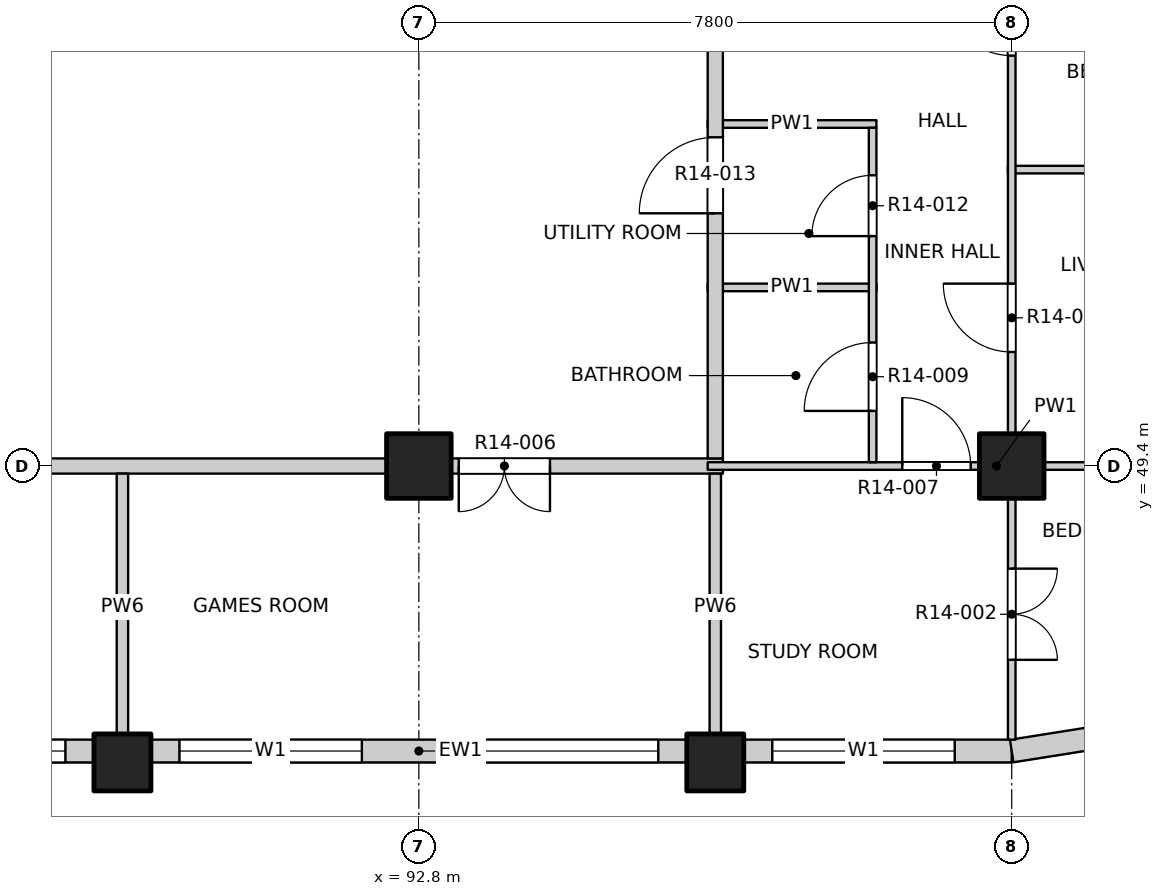
"""IFC4 building model, lengths in metres.
Left out: names, types, materials, properties, quantities, classifications, styles, units other than length and angle.
Written with IfcOpenShell. Run it as: python <this file> out.ifc"""

import sys

from ifc_helpers import new_model, si_unit, direction, frame, frame_2d, origin, origin_2d, place, context, subcontext, project, spatial, rectangle, extrude, element, fill, save


model = new_model("IFC4")
c1 = context("Model", 3, precision=1e-05, world=origin(), true_north=direction((0.0, 1.0)))
c2 = subcontext(c1, "Body", "Model", "MODEL_VIEW")
j1 = project(units=[si_unit("LENGTHUNIT", "METRE"), si_unit("PLANEANGLEUNIT", "RADIAN")], contexts=[c1])
p1 = place(None, origin())
s1 = spatial("IfcSite", under=j1, at=p1, CompositionType="ELEMENT")
p2 = place(p1, origin())
s2 = spatial("IfcBuilding", under=s1, at=p2, CompositionType="ELEMENT")
p3 = place(p2, frame((0.0, 0.0, 155.4)))
s3 = spatial("IfcBuildingStorey", under=s2, at=p3, CompositionType="ELEMENT", Elevation=155.4)
for number, where, z_axis, x_axis in (
    (1, (88.9, 45.5, -0.25), (0.0, 0.0, 1.0), (1.0, 0.0, 0.0)),
    (2, (96.7, 45.5, -0.25), (0.0, 0.0, 1.0), (1.0, 0.0, 0.0)),
):
    element("IfcColumn", number, at=place(p3, frame(where, z_axis=z_axis, x_axis=x_axis)), inside=s3, PredefinedType="COLUMN", context=c2, shape_type="SweptSolid", body=[
        extrude(rectangle(XDim=0.75, YDim=0.75, at=origin_2d()), origin(), (0.0, 0.0, 1.0), 3.4),
    ])
for number, where, z_axis, x_axis in (
    (3, (92.8, 49.4, -0.25), (0.0, 0.0, 1.0), (1.0, 0.0, 0.0)),
    (4, (100.6, 49.4, -0.25), (0.0, 0.0, 1.0), (1.0, 0.0, 0.0)),
):
    element("IfcColumn", number, at=place(p3, frame(where, z_axis=z_axis, x_axis=x_axis)), inside=s3, PredefinedType="COLUMN", context=c2, shape_type="SweptSolid", body=[
        extrude(rectangle(XDim=0.85, YDim=0.85, at=origin_2d()), origin(), (0.0, 0.0, 1.0), 3.4),
    ])
p4 = place(p3, frame((81.475, 45.65, 0.0), z_axis=(0.0, 0.0, 1.0), x_axis=(1.0, 0.0, 0.0)))
e5 = element("IfcWall", 5, at=p4, inside=s3, PredefinedType="SOLIDWALL", context=c2, shape_type="SweptSolid", body=[
    extrude(rectangle(XDim=7.05, YDim=0.3, at=frame_2d((3.525, 0.0))), origin(), (0.0, 0.0, 1.0), 2.7),
])
p5 = place(p4, frame((0.375, 0.0, 0.9)))
e6 = element("IfcOpeningElement", 6, at=p5, cuts=e5, PredefinedType="OPENING", context=c2, shape_type="SweptSolid", body=[
    extrude(rectangle(XDim=2.4, YDim=1.8, at=frame_2d((1.2, 0.9))), frame((0.0, 0.16, 0.0), z_axis=(0.0, -1.0, 0.0), x_axis=(1.0, 0.0, 0.0)), (0.0, 0.0, 1.0), 0.32),
])
p6 = place(p4, frame((4.275, 0.0, 0.9)))
e7 = element("IfcOpeningElement", 7, at=p6, cuts=e5, PredefinedType="OPENING", context=c2, shape_type="SweptSolid", body=[
    extrude(rectangle(XDim=2.4, YDim=1.8, at=frame_2d((1.2, 0.9))), frame((0.0, 0.16, 0.0), z_axis=(0.0, -1.0, 0.0), x_axis=(1.0, 0.0, 0.0)), (0.0, 0.0, 1.0), 0.32),
])
p7 = place(p3, frame((89.275, 45.65, 0.0), z_axis=(0.0, 0.0, 1.0), x_axis=(1.0, 0.0, 0.0)))
e8 = element("IfcWall", 8, at=p7, inside=s3, PredefinedType="SOLIDWALL", context=c2, shape_type="SweptSolid", body=[
    extrude(rectangle(XDim=7.05, YDim=0.3, at=frame_2d((3.525, 0.0))), origin(), (0.0, 0.0, 1.0), 2.7),
])
p8 = place(p7, frame((0.375, 0.0, 0.9)))
e9 = element("IfcOpeningElement", 9, at=p8, cuts=e8, PredefinedType="OPENING", context=c2, shape_type="SweptSolid", body=[
    extrude(rectangle(XDim=2.4, YDim=1.8, at=frame_2d((1.2, 0.9))), frame((0.0, 0.16, 0.0), z_axis=(0.0, -1.0, 0.0), x_axis=(1.0, 0.0, 0.0)), (0.0, 0.0, 1.0), 0.32),
])
p9 = place(p7, frame((4.275, 0.0, 0.9)))
e10 = element("IfcOpeningElement", 10, at=p9, cuts=e8, PredefinedType="OPENING", context=c2, shape_type="SweptSolid", body=[
    extrude(rectangle(XDim=2.4, YDim=1.8, at=frame_2d((1.2, 0.9))), frame((0.0, 0.16, 0.0), z_axis=(0.0, -1.0, 0.0), x_axis=(1.0, 0.0, 0.0)), (0.0, 0.0, 1.0), 0.32),
])
p10 = place(p3, frame((97.075, 45.65, 0.0), z_axis=(0.0, 0.0, 1.0), x_axis=(1.0, 0.0, 0.0)))
e11 = element("IfcWall", 11, at=p10, inside=s3, PredefinedType="SOLIDWALL", context=c2, shape_type="SweptSolid", body=[
    extrude(rectangle(XDim=3.525, YDim=0.3, at=frame_2d((1.763, 0.0))), origin(), (0.0, 0.0, 1.0), 2.7),
])
p11 = place(p10, frame((0.375, 0.0, 0.9)))
e12 = element("IfcOpeningElement", 12, at=p11, cuts=e11, PredefinedType="OPENING", context=c2, shape_type="SweptSolid", body=[
    extrude(rectangle(XDim=2.4, YDim=1.8, at=frame_2d((1.2, 0.9))), frame((0.0, 0.16, 0.0), z_axis=(0.0, -1.0, 0.0), x_axis=(1.0, 0.0, 0.0)), (0.0, 0.0, 1.0), 0.32),
])
p12 = place(p3, frame((100.6, 45.65, 0.0), z_axis=(0.0, 0.0, 1.0), x_axis=(0.987678452879, 0.156496880861, 0.0)))
e13 = element("IfcWall", 13, at=p12, inside=s3, PredefinedType="SOLIDWALL", context=c2, shape_type="SweptSolid", body=[
    extrude(rectangle(XDim=1.173, YDim=0.3, at=frame_2d((0.586, 0.0))), origin(), (0.0, 0.0, 1.0), 2.7),
])
p13 = place(p3, frame((73.2, 49.4, 0.0), z_axis=(0.0, 0.0, 1.0), x_axis=(1.0, 0.0, 0.0)))
e14 = element("IfcWall", 14, at=p13, inside=s3, PredefinedType="PARTITIONING", context=c2, shape_type="SweptSolid", body=[
    extrude(rectangle(XDim=23.6, YDim=0.2, at=frame_2d((11.8, 0.0))), origin(), (0.0, 0.0, 1.0), 3.15),
])
p14 = place(p13, frame((4.525, 0.0, 0.0)))
e15 = element("IfcOpeningElement", 15, at=p14, cuts=e14, PredefinedType="OPENING", context=c2, shape_type="SweptSolid", body=[
    extrude(rectangle(XDim=1.2, YDim=2.1, at=frame_2d((0.6, 1.05))), frame((0.0, 0.11, 0.0), z_axis=(0.0, -1.0, 0.0), x_axis=(1.0, 0.0, 0.0)), (0.0, 0.0, 1.0), 0.22),
])
p15 = place(p13, frame((12.325, 0.0, 0.0)))
e16 = element("IfcOpeningElement", 16, at=p15, cuts=e14, PredefinedType="OPENING", context=c2, shape_type="SweptSolid", body=[
    extrude(rectangle(XDim=1.2, YDim=2.1, at=frame_2d((0.6, 1.05))), frame((0.0, 0.11, 0.0), z_axis=(0.0, -1.0, 0.0), x_axis=(1.0, 0.0, 0.0)), (0.0, 0.0, 1.0), 0.22),
])
p16 = place(p13, frame((20.125, 0.0, 0.0)))
e17 = element("IfcOpeningElement", 17, at=p16, cuts=e14, PredefinedType="OPENING", context=c2, shape_type="SweptSolid", body=[
    extrude(rectangle(XDim=1.2, YDim=2.1, at=frame_2d((0.6, 1.05))), frame((0.0, 0.11, 0.0), z_axis=(0.0, -1.0, 0.0), x_axis=(1.0, 0.0, 0.0)), (0.0, 0.0, 1.0), 0.22),
])
p17 = place(p3, frame((96.6, 49.4, 0.0), z_axis=(0.0, 0.0, 1.0), x_axis=(1.0, 0.0, 0.0)))
e18 = element("IfcWall", 18, at=p17, inside=s3, PredefinedType="PARTITIONING", context=c2, shape_type="SweptSolid", body=[
    extrude(rectangle(XDim=7.6, YDim=0.1, at=frame_2d((3.8, 0.0))), origin(), (0.0, 0.0, 1.0), 3.15),
])
p18 = place(p17, frame((2.56, 0.0, 0.0)))
e19 = element("IfcOpeningElement", 19, at=p18, cuts=e18, PredefinedType="OPENING", context=c2, shape_type="SweptSolid", body=[
    extrude(rectangle(XDim=0.9, YDim=2.1, at=frame_2d((0.45, 1.05))), frame((0.0, 0.06, 0.0), z_axis=(0.0, -1.0, 0.0), x_axis=(1.0, 0.0, 0.0)), (0.0, 0.0, 1.0), 0.12),
])
p19 = place(p3, frame((96.6, 51.75, 0.0), z_axis=(0.0, 0.0, 1.0), x_axis=(1.0, 0.0, 0.0)))
e20 = element("IfcWall", 20, at=p19, inside=s3, PredefinedType="PARTITIONING", context=c2, shape_type="SweptSolid", body=[
    extrude(rectangle(XDim=2.22, YDim=0.1, at=frame_2d((1.11, 0.0))), origin(), (0.0, 0.0, 1.0), 3.15),
])
p20 = place(p3, frame((100.55, 53.3, 0.0), z_axis=(0.0, 0.0, 1.0), x_axis=(1.0, 0.0, 0.0)))
e21 = element("IfcWall", 21, at=p20, inside=s3, PredefinedType="PARTITIONING", context=c2, shape_type="SweptSolid", body=[
    extrude(rectangle(XDim=3.65, YDim=0.1, at=frame_2d((1.825, 0.0))), origin(), (0.0, 0.0, 1.0), 3.15),
])
p21 = place(p3, frame((96.6, 53.9, 0.0), z_axis=(0.0, 0.0, 1.0), x_axis=(1.0, 0.0, 0.0)))
e22 = element("IfcWall", 22, at=p21, inside=s3, PredefinedType="PARTITIONING", context=c2, shape_type="SweptSolid", body=[
    extrude(rectangle(XDim=2.22, YDim=0.1, at=frame_2d((1.11, 0.0))), origin(), (0.0, 0.0, 1.0), 3.15),
])
p22 = place(p3, frame((88.9, 45.8, 0.0), z_axis=(0.0, 0.0, 1.0), x_axis=(0.0, 1.0, 0.0)))
e23 = element("IfcWall", 23, at=p22, inside=s3, PredefinedType="PARTITIONING", context=c2, shape_type="SweptSolid", body=[
    extrude(rectangle(XDim=3.5, YDim=0.15, at=frame_2d((1.75, 0.0))), origin(), (0.0, 0.0, 1.0), 2.55),
])
p23 = place(p3, frame((96.7, 45.8, 0.0), z_axis=(0.0, 0.0, 1.0), x_axis=(0.0, 1.0, 0.0)))
e24 = element("IfcWall", 24, at=p23, inside=s3, PredefinedType="PARTITIONING", context=c2, shape_type="SweptSolid", body=[
    extrude(rectangle(XDim=3.5, YDim=0.15, at=frame_2d((1.75, 0.0))), origin(), (0.0, 0.0, 1.0), 3.15),
])
p24 = place(p3, frame((96.7, 49.5, 0.0), z_axis=(0.0, 0.0, 1.0), x_axis=(0.0, 1.0, 0.0)))
e25 = element("IfcWall", 25, at=p24, inside=s3, PredefinedType="PARTITIONING", context=c2, shape_type="SweptSolid", body=[
    extrude(rectangle(XDim=34.7, YDim=0.2, at=frame_2d((17.35, 0.0))), origin(), (0.0, 0.0, 1.0), 3.15),
])
p25 = place(p24, frame((3.225, 0.0, 0.0)))
e26 = element("IfcOpeningElement", 26, at=p25, cuts=e25, PredefinedType="OPENING", context=c2, shape_type="SweptSolid", body=[
    extrude(rectangle(XDim=1.0, YDim=2.1, at=frame_2d((0.5, 1.05))), frame((0.0, 0.11, 0.0), z_axis=(0.0, -1.0, 0.0), x_axis=(1.0, 0.0, 0.0)), (0.0, 0.0, 1.0), 0.22),
])
p26 = place(p24, frame((19.775, 0.0, 0.0)))
e27 = element("IfcOpeningElement", 27, at=p26, cuts=e25, PredefinedType="OPENING", context=c2, shape_type="SweptSolid", body=[
    extrude(rectangle(XDim=1.0, YDim=2.1, at=frame_2d((0.5, 1.05))), frame((0.0, 0.11, 0.0), z_axis=(0.0, -1.0, 0.0), x_axis=(1.0, 0.0, 0.0)), (0.0, 0.0, 1.0), 0.22),
])
p27 = place(p24, frame((24.125, 0.0, 0.0)))
e28 = element("IfcOpeningElement", 28, at=p27, cuts=e25, PredefinedType="OPENING", context=c2, shape_type="SweptSolid", body=[
    extrude(rectangle(XDim=1.0, YDim=2.1, at=frame_2d((0.5, 1.05))), frame((0.0, 0.11, 0.0), z_axis=(0.0, -1.0, 0.0), x_axis=(1.0, 0.0, 0.0)), (0.0, 0.0, 1.0), 0.22),
])
p28 = place(p3, frame((98.77, 49.45, 0.0), z_axis=(0.0, 0.0, 1.0), x_axis=(0.0, 1.0, 0.0)))
e29 = element("IfcWall", 29, at=p28, inside=s3, PredefinedType="PARTITIONING", context=c2, shape_type="SweptSolid", body=[
    extrude(rectangle(XDim=4.4, YDim=0.1, at=frame_2d((2.2, 0.0))), origin(), (0.0, 0.0, 1.0), 3.15),
])
p29 = place(p28, frame((0.675, 0.0, 0.0)))
e30 = element("IfcOpeningElement", 30, at=p29, cuts=e29, PredefinedType="OPENING", context=c2, shape_type="SweptSolid", body=[
    extrude(rectangle(XDim=0.9, YDim=2.1, at=frame_2d((0.45, 1.05))), frame((0.0, 0.06, 0.0), z_axis=(0.0, -1.0, 0.0), x_axis=(1.0, 0.0, 0.0)), (0.0, 0.0, 1.0), 0.12),
])
p30 = place(p28, frame((2.975, 0.0, 0.0)))
e31 = element("IfcOpeningElement", 31, at=p30, cuts=e29, PredefinedType="OPENING", context=c2, shape_type="SweptSolid", body=[
    extrude(rectangle(XDim=0.8, YDim=2.1, at=frame_2d((0.4, 1.05))), frame((0.0, 0.06, 0.0), z_axis=(0.0, -1.0, 0.0), x_axis=(1.0, 0.0, 0.0)), (0.0, 0.0, 1.0), 0.12),
])
p31 = place(p3, frame((100.6, 45.8, 0.0), z_axis=(0.0, 0.0, 1.0), x_axis=(0.0, 1.0, 0.0)))
e32 = element("IfcWall", 32, at=p31, inside=s3, PredefinedType="PARTITIONING", context=c2, shape_type="SweptSolid", body=[
    extrude(rectangle(XDim=38.4, YDim=0.1, at=frame_2d((19.2, 0.0))), origin(), (0.0, 0.0, 1.0), 3.15),
])
p32 = place(p31, frame((1.05, 0.0, 0.0)))
e33 = element("IfcOpeningElement", 33, at=p32, cuts=e32, PredefinedType="OPENING", context=c2, shape_type="SweptSolid", body=[
    extrude(rectangle(XDim=1.2, YDim=2.1, at=frame_2d((0.6, 1.05))), frame((0.0, 0.06, 0.0), z_axis=(0.0, -1.0, 0.0), x_axis=(1.0, 0.0, 0.0)), (0.0, 0.0, 1.0), 0.12),
])
p33 = place(p31, frame((5.1, 0.0, 0.0)))
e34 = element("IfcOpeningElement", 34, at=p33, cuts=e32, PredefinedType="OPENING", context=c2, shape_type="SweptSolid", body=[
    extrude(rectangle(XDim=0.9, YDim=2.1, at=frame_2d((0.45, 1.05))), frame((0.0, 0.06, 0.0), z_axis=(0.0, -1.0, 0.0), x_axis=(1.0, 0.0, 0.0)), (0.0, 0.0, 1.0), 0.12),
])
p34 = place(p31, frame((9.0, 0.0, 0.0)))
e35 = element("IfcOpeningElement", 35, at=p34, cuts=e32, PredefinedType="OPENING", context=c2, shape_type="SweptSolid", body=[
    extrude(rectangle(XDim=0.9, YDim=2.1, at=frame_2d((0.45, 1.05))), frame((0.0, 0.06, 0.0), z_axis=(0.0, -1.0, 0.0), x_axis=(1.0, 0.0, 0.0)), (0.0, 0.0, 1.0), 0.12),
])
p35 = place(p31, frame((12.9, 0.0, 0.0)))
e36 = element("IfcOpeningElement", 36, at=p35, cuts=e32, PredefinedType="OPENING", context=c2, shape_type="SweptSolid", body=[
    extrude(rectangle(XDim=0.9, YDim=2.1, at=frame_2d((0.45, 1.05))), frame((0.0, 0.06, 0.0), z_axis=(0.0, -1.0, 0.0), x_axis=(1.0, 0.0, 0.0)), (0.0, 0.0, 1.0), 0.12),
])
p36 = place(p31, frame((16.8, 0.0, 0.0)))
e37 = element("IfcOpeningElement", 37, at=p36, cuts=e32, PredefinedType="OPENING", context=c2, shape_type="SweptSolid", body=[
    extrude(rectangle(XDim=0.9, YDim=2.1, at=frame_2d((0.45, 1.05))), frame((0.0, 0.06, 0.0), z_axis=(0.0, -1.0, 0.0), x_axis=(1.0, 0.0, 0.0)), (0.0, 0.0, 1.0), 0.12),
])
p37 = place(p31, frame((20.7, 0.0, 0.0)))
e38 = element("IfcOpeningElement", 38, at=p37, cuts=e32, PredefinedType="OPENING", context=c2, shape_type="SweptSolid", body=[
    extrude(rectangle(XDim=0.9, YDim=2.1, at=frame_2d((0.45, 1.05))), frame((0.0, 0.06, 0.0), z_axis=(0.0, -1.0, 0.0), x_axis=(1.0, 0.0, 0.0)), (0.0, 0.0, 1.0), 0.12),
])
p38 = place(p31, frame((24.6, 0.0, 0.0)))
e39 = element("IfcOpeningElement", 39, at=p38, cuts=e32, PredefinedType="OPENING", context=c2, shape_type="SweptSolid", body=[
    extrude(rectangle(XDim=0.9, YDim=2.1, at=frame_2d((0.45, 1.05))), frame((0.0, 0.06, 0.0), z_axis=(0.0, -1.0, 0.0), x_axis=(1.0, 0.0, 0.0)), (0.0, 0.0, 1.0), 0.12),
])
p39 = place(p31, frame((28.5, 0.0, 0.0)))
e40 = element("IfcOpeningElement", 40, at=p39, cuts=e32, PredefinedType="OPENING", context=c2, shape_type="SweptSolid", body=[
    extrude(rectangle(XDim=0.9, YDim=2.1, at=frame_2d((0.45, 1.05))), frame((0.0, 0.06, 0.0), z_axis=(0.0, -1.0, 0.0), x_axis=(1.0, 0.0, 0.0)), (0.0, 0.0, 1.0), 0.12),
])
p40 = place(p31, frame((32.4, 0.0, 0.0)))
e41 = element("IfcOpeningElement", 41, at=p40, cuts=e32, PredefinedType="OPENING", context=c2, shape_type="SweptSolid", body=[
    extrude(rectangle(XDim=0.9, YDim=2.1, at=frame_2d((0.45, 1.05))), frame((0.0, 0.06, 0.0), z_axis=(0.0, -1.0, 0.0), x_axis=(1.0, 0.0, 0.0)), (0.0, 0.0, 1.0), 0.12),
])
p41 = place(p31, frame((36.15, 0.0, 0.0)))
e42 = element("IfcOpeningElement", 42, at=p41, cuts=e32, PredefinedType="OPENING", context=c2, shape_type="SweptSolid", body=[
    extrude(rectangle(XDim=1.2, YDim=2.1, at=frame_2d((0.6, 1.05))), frame((0.0, 0.06, 0.0), z_axis=(0.0, -1.0, 0.0), x_axis=(1.0, 0.0, 0.0)), (0.0, 0.0, 1.0), 0.12),
])
p42 = place(p6, origin())
e43 = element("IfcWindow", 43, at=p42, inside=s3, PartitioningType="DOUBLE_PANEL_VERTICAL", PredefinedType="WINDOW", context=c2, shape_type="SweptSolid", body=[
    extrude(rectangle(XDim=2.4, YDim=1.8, at=frame_2d((1.2, 0.9))), frame((0.0, 0.03, 0.0), z_axis=(0.0, -1.0, 0.0), x_axis=(1.0, 0.0, 0.0)), (0.0, 0.0, 1.0), 0.06),
])
fill(e7, e43)
p43 = place(p8, origin())
e44 = element("IfcWindow", 44, at=p43, inside=s3, PartitioningType="DOUBLE_PANEL_VERTICAL", PredefinedType="WINDOW", context=c2, shape_type="SweptSolid", body=[
    extrude(rectangle(XDim=2.4, YDim=1.8, at=frame_2d((1.2, 0.9))), frame((0.0, 0.03, 0.0), z_axis=(0.0, -1.0, 0.0), x_axis=(1.0, 0.0, 0.0)), (0.0, 0.0, 1.0), 0.06),
])
fill(e9, e44)
p44 = place(p9, origin())
e45 = element("IfcWindow", 45, at=p44, inside=s3, PartitioningType="DOUBLE_PANEL_VERTICAL", PredefinedType="WINDOW", context=c2, shape_type="SweptSolid", body=[
    extrude(rectangle(XDim=2.4, YDim=1.8, at=frame_2d((1.2, 0.9))), frame((0.0, 0.03, 0.0), z_axis=(0.0, -1.0, 0.0), x_axis=(1.0, 0.0, 0.0)), (0.0, 0.0, 1.0), 0.06),
])
fill(e10, e45)
p45 = place(p11, origin())
e46 = element("IfcWindow", 46, at=p45, inside=s3, PartitioningType="DOUBLE_PANEL_VERTICAL", PredefinedType="WINDOW", context=c2, shape_type="SweptSolid", body=[
    extrude(rectangle(XDim=2.4, YDim=1.8, at=frame_2d((1.2, 0.9))), frame((0.0, 0.03, 0.0), z_axis=(0.0, -1.0, 0.0), x_axis=(1.0, 0.0, 0.0)), (0.0, 0.0, 1.0), 0.06),
])
fill(e12, e46)
p46 = place(p32, origin())
e47 = element("IfcDoor", 47, at=p46, inside=s3, OperationType="DOUBLE_DOOR_SINGLE_SWING", PredefinedType="DOOR", context=c2, shape_type="SweptSolid", body=[
    extrude(rectangle(XDim=1.2, YDim=2.1, at=frame_2d((0.6, 1.05))), frame((0.0, 0.025, 0.0), z_axis=(0.0, -1.0, 0.0), x_axis=(1.0, 0.0, 0.0)), (0.0, 0.0, 1.0), 0.05),
])
fill(e33, e47)
p47 = place(p16, origin())
e48 = element("IfcDoor", 48, at=p47, inside=s3, OperationType="DOUBLE_DOOR_SINGLE_SWING", PredefinedType="DOOR", context=c2, shape_type="SweptSolid", body=[
    extrude(rectangle(XDim=1.2, YDim=2.1, at=frame_2d((0.6, 1.05))), frame((0.0, 0.025, 0.0), z_axis=(0.0, -1.0, 0.0), x_axis=(1.0, 0.0, 0.0)), (0.0, 0.0, 1.0), 0.05),
])
fill(e17, e48)
p48 = place(p18, origin())
e49 = element("IfcDoor", 49, at=p48, inside=s3, OperationType="SINGLE_SWING_LEFT", PredefinedType="DOOR", context=c2, shape_type="SweptSolid", body=[
    extrude(rectangle(XDim=0.9, YDim=2.1, at=frame_2d((0.45, 1.05))), frame((0.0, 0.025, 0.0), z_axis=(0.0, -1.0, 0.0), x_axis=(1.0, 0.0, 0.0)), (0.0, 0.0, 1.0), 0.05),
])
fill(e19, e49)
p49 = place(p29, origin())
e50 = element("IfcDoor", 50, at=p49, inside=s3, OperationType="SINGLE_SWING_LEFT", PredefinedType="DOOR", context=c2, shape_type="SweptSolid", body=[
    extrude(rectangle(XDim=0.9, YDim=2.1, at=frame_2d((0.45, 1.05))), frame((0.0, 0.025, 0.0), z_axis=(0.0, -1.0, 0.0), x_axis=(1.0, 0.0, 0.0)), (0.0, 0.0, 1.0), 0.05),
])
fill(e30, e50)
p50 = place(p33, origin())
e51 = element("IfcDoor", 51, at=p50, inside=s3, OperationType="SINGLE_SWING_RIGHT", PredefinedType="DOOR", context=c2, shape_type="SweptSolid", body=[
    extrude(rectangle(XDim=0.9, YDim=2.1, at=frame_2d((0.45, 1.05))), frame((0.0, 0.025, 0.0), z_axis=(0.0, -1.0, 0.0), x_axis=(1.0, 0.0, 0.0)), (0.0, 0.0, 1.0), 0.05),
])
fill(e34, e51)
p51 = place(p30, origin())
e52 = element("IfcDoor", 52, at=p51, inside=s3, OperationType="SINGLE_SWING_LEFT", PredefinedType="DOOR", context=c2, shape_type="SweptSolid", body=[
    extrude(rectangle(XDim=0.8, YDim=2.1, at=frame_2d((0.4, 1.05))), frame((0.0, 0.025, 0.0), z_axis=(0.0, -1.0, 0.0), x_axis=(1.0, 0.0, 0.0)), (0.0, 0.0, 1.0), 0.05),
])
fill(e31, e52)
p52 = place(p25, origin())
e53 = element("IfcDoor", 53, at=p52, inside=s3, OperationType="SINGLE_SWING_RIGHT", PredefinedType="DOOR", context=c2, shape_type="SweptSolid", body=[
    extrude(rectangle(XDim=1.0, YDim=2.1, at=frame_2d((0.5, 1.05))), frame((0.0, 0.025, 0.0), z_axis=(0.0, -1.0, 0.0), x_axis=(1.0, 0.0, 0.0)), (0.0, 0.0, 1.0), 0.05),
])
fill(e26, e53)
p53 = place(p34, origin())
e54 = element("IfcDoor", 54, at=p53, inside=s3, OperationType="SINGLE_SWING_RIGHT", PredefinedType="DOOR", context=c2, shape_type="SweptSolid", body=[
    extrude(rectangle(XDim=0.9, YDim=2.1, at=frame_2d((0.45, 1.05))), frame((0.0, 0.025, 0.0), z_axis=(0.0, -1.0, 0.0), x_axis=(1.0, 0.0, 0.0)), (0.0, 0.0, 1.0), 0.05),
])
fill(e35, e54)
save(model, sys.argv[1])
